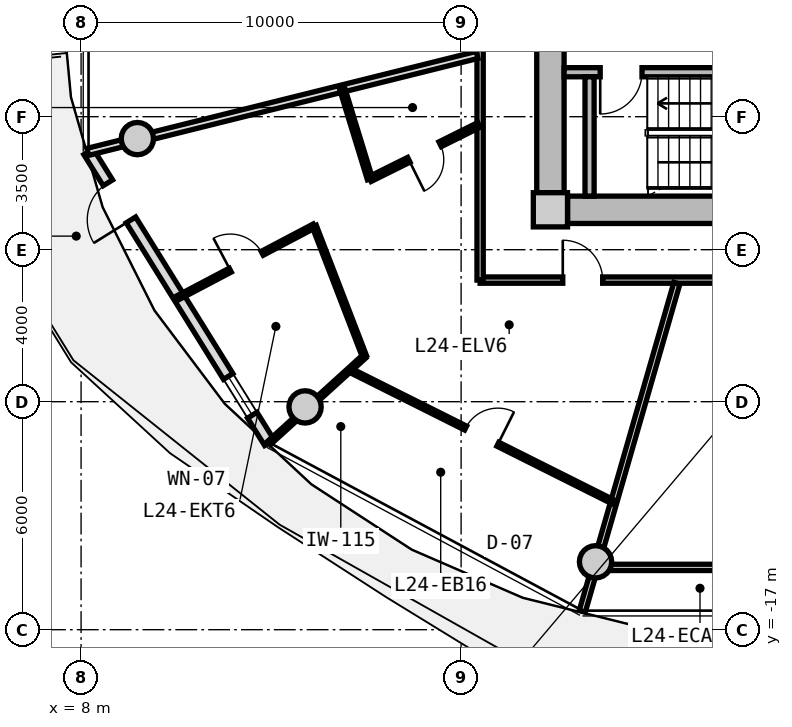
"""IFC4 building model, lengths in metres.
Left out: names, types, materials, properties, quantities, classifications, styles, units other than length and angle.
Written with IfcOpenShell. Run it as: python <this file> out.ifc"""

import sys

from ifc_helpers import new_model, si_unit, direction, frame, frame_2d, origin, origin_2d, place, context, subcontext, project, spatial, rectangle, circle, extrude, source, transform, mapped, element, fill, save


model = new_model("IFC4")
c1 = context("Model", 3, precision=1e-05, world=origin(), true_north=direction((0.0, 1.0)))
c2 = subcontext(c1, "Body", "Model", "MODEL_VIEW")
j1 = project(units=[si_unit("LENGTHUNIT", "METRE"), si_unit("PLANEANGLEUNIT", "RADIAN")], contexts=[c1])
p1 = place(None, origin())
s1 = spatial("IfcSite", under=j1, at=p1, CompositionType="ELEMENT")
p2 = place(p1, origin())
s2 = spatial("IfcBuilding", under=s1, at=p2, CompositionType="ELEMENT")
p3 = place(p2, frame((0.0, 0.0, 81.0)))
s3 = spatial("IfcBuildingStorey", under=s2, at=p3, CompositionType="ELEMENT", Elevation=81.0)
m1 = source(origin(), c2, "Body", "SweptSolid", [
    extrude(rectangle(XDim=0.9, YDim=0.9, at=origin_2d()), origin(), (0.0, 0.0, 1.0), 3.05),
])
p4 = place(p3, frame((20.35, -5.95, 0.0), z_axis=(0.0, 0.0, 1.0), x_axis=(1.0, 0.0, 0.0)))
e1 = element("IfcColumn", 1, at=p4, inside=s3, PredefinedType="COLUMN", context=c2, shape_type="MappedRepresentation", body=[
    mapped(m1, transform((0.0, 0.0, 0.0), x_axis=(1.0, 0.0, 0.0), y_axis=(0.0, 1.0, 0.0), z_axis=(0.0, 0.0, 1.0), scale=1.0)),
])
m2 = source(origin(), c2, "Body", "SweptSolid", [
    extrude(rectangle(XDim=14.4, YDim=0.72, at=frame_2d((7.2, 0.0))), origin(), (0.0, 0.0, 1.0), 2.79),
])
p5 = place(p3, frame((35.2, -5.95, 0.0), z_axis=(0.0, 0.0, 1.0), x_axis=(-1.0, 0.0, 0.0)))
e2 = element("IfcWall", 2, at=p5, inside=s3, PredefinedType="SHEAR", context=c2, shape_type="MappedRepresentation", body=[
    mapped(m2, transform((0.0, 0.0, 0.0), x_axis=(1.0, 0.0, 0.0), y_axis=(0.0, 1.0, 0.0), z_axis=(0.0, 0.0, 1.0), scale=1.0)),
])
m3 = source(origin(), c2, "Body", "SweptSolid", [
    extrude(rectangle(XDim=11.0, YDim=0.72, at=frame_2d((5.5, 0.0))), origin(), (0.0, 0.0, 1.0), 2.79),
])
p6 = place(p3, frame((20.35, -5.5, 0.0), z_axis=(0.0, 0.0, 1.0), x_axis=(0.0, 1.0, 0.0)))
e3 = element("IfcWall", 3, at=p6, inside=s3, PredefinedType="SHEAR", context=c2, shape_type="MappedRepresentation", body=[
    mapped(m3, transform((0.0, 0.0, 0.0), x_axis=(1.0, 0.0, 0.0), y_axis=(0.0, 1.0, 0.0), z_axis=(0.0, 0.0, 1.0), scale=1.0)),
])
p7 = place(p6, frame((3.8, 0.0, 0.0)))
e4 = element("IfcOpeningElement", 4, at=p7, cuts=e3, PredefinedType="OPENING", context=c2, shape_type="SweptSolid", body=[
    extrude(rectangle(XDim=1.2, YDim=2.15, at=frame_2d((0.6, 1.075))), frame((0.0, 0.37, 0.0), z_axis=(0.0, -1.0, 0.0), x_axis=(1.0, 0.0, 0.0)), (0.0, 0.0, 1.0), 0.74),
])
m4 = source(origin(), c2, "Body", "SweptSolid", [
    extrude(circle(Radius=0.425, at=origin_2d()), origin(), (0.0, 0.0, 1.0), 3.05),
])
for number, where, z_axis, x_axis in (
    (5, (9.481, -4.076, 0.0), (0.0, 0.0, 1.0), (1.0, 0.0, 0.0)),
    (6, (13.894, -11.137, 0.0), (0.0, 0.0, 1.0), (1.0, 0.0, 0.0)),
    (7, (21.537, -15.213, 0.0), (0.0, 0.0, 1.0), (1.0, 0.0, 0.0)),
):
    element("IfcColumn", number, at=place(p3, frame(where, z_axis=z_axis, x_axis=x_axis)), inside=s3, PredefinedType="COLUMN", context=c2, shape_type="MappedRepresentation", body=[
        mapped(m4, transform((0.0, 0.0, 0.0), x_axis=(1.0, 0.0, 0.0), y_axis=(0.0, 1.0, 0.0), z_axis=(0.0, 0.0, 1.0), scale=1.0)),
    ])
m5 = source(origin(), c2, "Body", "SweptSolid", [
    extrude(rectangle(XDim=9.014, YDim=0.29, at=frame_2d((4.507, 0.0))), origin(), (0.0, 0.0, 1.0), 2.79),
])
p8 = place(p3, frame((12.953, -12.077, 0.0), z_axis=(0.0, 0.0, 1.0), x_axis=(-0.527732945084, 0.849410347637, 0.0)))
e8 = element("IfcWall", 8, at=p8, inside=s3, PredefinedType="SOLIDWALL", context=c2, shape_type="MappedRepresentation", body=[
    mapped(m5, transform((0.0, 0.0, 0.0), x_axis=(1.0, 0.0, 0.0), y_axis=(0.0, 1.0, 0.0), z_axis=(0.0, 0.0, 1.0), scale=1.0)),
])
p9 = place(p8, frame((6.9, 0.0, 0.0)))
e9 = element("IfcOpeningElement", 9, at=p9, cuts=e8, PredefinedType="OPENING", context=c2, shape_type="SweptSolid", body=[
    extrude(rectangle(XDim=1.15, YDim=2.25, at=frame_2d((0.575, 1.125))), frame((0.0, 0.155, 0.0), z_axis=(0.0, -1.0, 0.0), x_axis=(1.0, 0.0, 0.0)), (0.0, 0.0, 1.0), 0.31),
])
p10 = place(p8, frame((0.85, 0.0, 0.85)))
e10 = element("IfcOpeningElement", 10, at=p10, cuts=e8, PredefinedType="OPENING", context=c2, shape_type="SweptSolid", body=[
    extrude(rectangle(XDim=1.2, YDim=1.5, at=frame_2d((0.6, 0.75))), frame((0.0, 0.155, 0.0), z_axis=(0.0, -1.0, 0.0), x_axis=(1.0, 0.0, 0.0)), (0.0, 0.0, 1.0), 0.31),
])
m6 = source(origin(), c2, "Body", "SweptSolid", [
    extrude(rectangle(XDim=7.83, YDim=0.24, at=frame_2d((3.915, 0.0))), origin(), (0.0, 0.0, 1.0), 2.79),
])
p11 = place(p3, frame((20.71, -2.33, 0.0), z_axis=(0.0, 0.0, 1.0), x_axis=(1.0, 0.0, 0.0)))
e11 = element("IfcWall", 11, at=p11, inside=s3, PredefinedType="PARTITIONING", context=c2, shape_type="MappedRepresentation", body=[
    mapped(m6, transform((0.0, 0.0, 0.0), x_axis=(1.0, 0.0, 0.0), y_axis=(0.0, 1.0, 0.0), z_axis=(0.0, 0.0, 1.0), scale=1.0)),
])
p12 = place(p11, frame((0.95, 0.0, 0.0)))
e12 = element("IfcOpeningElement", 12, at=p12, cuts=e11, PredefinedType="OPENING", context=c2, shape_type="SweptSolid", body=[
    extrude(rectangle(XDim=1.1, YDim=2.15, at=frame_2d((0.55, 1.075))), frame((0.0, 0.13, 0.0), z_axis=(0.0, -1.0, 0.0), x_axis=(1.0, 0.0, 0.0)), (0.0, 0.0, 1.0), 0.26),
])
m7 = source(origin(), c2, "Body", "SweptSolid", [
    extrude(rectangle(XDim=3.14, YDim=0.24, at=frame_2d((1.57, 0.0))), origin(), (0.0, 0.0, 1.0), 2.79),
])
p13 = place(p3, frame((21.38, -5.59, 0.0), z_axis=(0.0, 0.0, 1.0), x_axis=(0.0, 1.0, 0.0)))
e13 = element("IfcWall", 13, at=p13, inside=s3, PredefinedType="PARTITIONING", context=c2, shape_type="MappedRepresentation", body=[
    mapped(m7, transform((0.0, 0.0, 0.0), x_axis=(1.0, 0.0, 0.0), y_axis=(0.0, 1.0, 0.0), z_axis=(0.0, 0.0, 1.0), scale=1.0)),
])
m8 = source(origin(), c2, "Body", "SweptSolid", [
    extrude(rectangle(XDim=8.6, YDim=0.165, at=frame_2d((4.3, 0.0))), origin(), (0.0, 0.0, 1.0), 2.775),
])
p14 = place(p3, frame((27.1, -7.8, 0.0), z_axis=(0.0, 0.0, 1.0), x_axis=(-1.0, 0.0, 0.0)))
e14 = element("IfcWall", 14, at=p14, inside=s3, PredefinedType="PARTITIONING", context=c2, shape_type="MappedRepresentation", body=[
    mapped(m8, transform((0.0, 0.0, 0.0), x_axis=(1.0, 0.0, 0.0), y_axis=(0.0, 1.0, 0.0), z_axis=(0.0, 0.0, 1.0), scale=1.0)),
])
p15 = place(p14, frame((5.375, 0.0, 0.0)))
e15 = element("IfcOpeningElement", 15, at=p15, cuts=e14, PredefinedType="OPENING", context=c2, shape_type="SweptSolid", body=[
    extrude(rectangle(XDim=1.05, YDim=2.15, at=frame_2d((0.525, 1.075))), frame((0.0, 0.093, 0.0), z_axis=(0.0, -1.0, 0.0), x_axis=(1.0, 0.0, 0.0)), (0.0, 0.0, 1.0), 0.185),
])
m9 = source(origin(), c2, "Body", "SweptSolid", [
    extrude(rectangle(XDim=15.6, YDim=0.165, at=frame_2d((7.8, 0.0))), origin(), (0.0, 0.0, 1.0), 2.775),
])
p16 = place(p3, frame((18.5, -7.8, 0.0), z_axis=(0.0, 0.0, 1.0), x_axis=(0.0, 1.0, 0.0)))
e16 = element("IfcWall", 16, at=p16, inside=s3, PredefinedType="PARTITIONING", context=c2, shape_type="MappedRepresentation", body=[
    mapped(m9, transform((0.0, 0.0, 0.0), x_axis=(1.0, 0.0, 0.0), y_axis=(0.0, 1.0, 0.0), z_axis=(0.0, 0.0, 1.0), scale=1.0)),
])
p17 = place(p16, frame((11.623, 0.0, 0.0)))
e17 = element("IfcOpeningElement", 17, at=p17, cuts=e16, PredefinedType="OPENING", context=c2, shape_type="SweptSolid", body=[
    extrude(rectangle(XDim=1.25, YDim=2.2, at=frame_2d((0.625, 1.1))), frame((0.0, 0.093, 0.0), z_axis=(0.0, -1.0, 0.0), x_axis=(1.0, 0.0, 0.0)), (0.0, 0.0, 1.0), 0.185),
])
p18 = place(p16, frame((7.175, 0.0, 0.0)))
e18 = element("IfcOpeningElement", 18, at=p18, cuts=e16, PredefinedType="OPENING", context=c2, shape_type="SweptSolid", body=[
    extrude(rectangle(XDim=1.25, YDim=2.2, at=frame_2d((0.625, 1.1))), frame((0.0, 0.093, 0.0), z_axis=(0.0, -1.0, 0.0), x_axis=(1.0, 0.0, 0.0)), (0.0, 0.0, 1.0), 0.185),
])
m10 = source(origin(), c2, "Body", "SweptSolid", [
    extrude(rectangle(XDim=8.989, YDim=0.165, at=frame_2d((4.495, 0.0))), origin(), (0.0, 0.0, 1.0), 2.275),
])
p19 = place(p3, frame((23.678, -7.88, 0.0), z_axis=(0.0, 0.0, 1.0), x_axis=(-0.27702323008, -0.960863221274, 0.0)))
e19 = element("IfcWall", 19, at=p19, inside=s3, PredefinedType="PARTITIONING", context=c2, shape_type="MappedRepresentation", body=[
    mapped(m10, transform((0.0, 0.0, 0.0), x_axis=(1.0, 0.0, 0.0), y_axis=(0.0, 1.0, 0.0), z_axis=(0.0, 0.0, 1.0), scale=1.0)),
])
m11 = source(origin(), c2, "Body", "SweptSolid", [
    extrude(rectangle(XDim=5.814, YDim=0.165, at=frame_2d((2.907, 0.0))), origin(), (0.0, 0.0, 1.0), 2.275),
])
p20 = place(p3, frame((21.366, -15.36, 0.0), z_axis=(0.0, 0.0, 1.0), x_axis=(1.0, 0.0, 0.0)))
e20 = element("IfcWall", 20, at=p20, inside=s3, PredefinedType="PARTITIONING", context=c2, shape_type="MappedRepresentation", body=[
    mapped(m11, transform((0.0, 0.0, 0.0), x_axis=(1.0, 0.0, 0.0), y_axis=(0.0, 1.0, 0.0), z_axis=(0.0, 0.0, 1.0), scale=1.0)),
])
m12 = source(origin(), c2, "Body", "SweptSolid", [
    extrude(rectangle(XDim=10.556, YDim=0.19, at=frame_2d((5.278, 0.0))), origin(), (0.0, 0.0, 1.0), 2.275),
])
p21 = place(p3, frame((18.42, -1.875, 0.0), z_axis=(0.0, 0.0, 1.0), x_axis=(-0.970363857851, -0.241648470667, 0.0)))
e21 = element("IfcWall", 21, at=p21, inside=s3, PredefinedType="PARTITIONING", context=c2, shape_type="MappedRepresentation", body=[
    mapped(m12, transform((0.0, 0.0, 0.0), x_axis=(1.0, 0.0, 0.0), y_axis=(0.0, 1.0, 0.0), z_axis=(0.0, 0.0, 1.0), scale=1.0)),
])
m13 = source(origin(), c2, "Body", "SweptSolid", [
    extrude(rectangle(XDim=7.767, YDim=0.115, at=frame_2d((3.884, 0.0))), origin(), (0.0, 0.0, 1.0), 2.775),
])
p22 = place(p3, frame((15.07, -10.167, 0.0), z_axis=(0.0, 0.0, 1.0), x_axis=(0.894188177352, -0.447691303783, 0.0)))
e22 = element("IfcWall", 22, at=p22, inside=s3, PredefinedType="PARTITIONING", context=c2, shape_type="MappedRepresentation", body=[
    mapped(m13, transform((0.0, 0.0, 0.0), x_axis=(1.0, 0.0, 0.0), y_axis=(0.0, 1.0, 0.0), z_axis=(0.0, 0.0, 1.0), scale=1.0)),
])
p23 = place(p22, frame((3.409, 0.0, 0.0)))
e23 = element("IfcOpeningElement", 23, at=p23, cuts=e22, PredefinedType="OPENING", context=c2, shape_type="SweptSolid", body=[
    extrude(rectangle(XDim=0.95, YDim=2.1, at=frame_2d((0.475, 1.05))), frame((0.0, 0.067, 0.0), z_axis=(0.0, -1.0, 0.0), x_axis=(1.0, 0.0, 0.0)), (0.0, 0.0, 1.0), 0.135),
])
m14 = source(origin(), c2, "Body", "SweptSolid", [
    extrude(rectangle(XDim=3.393, YDim=0.115, at=frame_2d((1.696, 0.0))), origin(), (0.0, 0.0, 1.0), 2.415),
])
p24 = place(p3, frame((15.451, -9.811, 0.0), z_axis=(0.0, 0.0, 1.0), x_axis=(-0.740356690907, -0.672214229416, 0.0)))
e24 = element("IfcWall", 24, at=p24, inside=s3, PredefinedType="PARTITIONING", context=c2, shape_type="MappedRepresentation", body=[
    mapped(m14, transform((0.0, 0.0, 0.0), x_axis=(1.0, 0.0, 0.0), y_axis=(0.0, 1.0, 0.0), z_axis=(0.0, 0.0, 1.0), scale=1.0)),
])
m15 = source(origin(), c2, "Body", "SweptSolid", [
    extrude(rectangle(XDim=3.203, YDim=0.14, at=frame_2d((1.601, 0.0))), origin(), (0.0, 0.0, 1.0), 2.775),
])
p25 = place(p3, frame((18.47, -3.717, 0.0), z_axis=(0.0, 0.0, 1.0), x_axis=(-0.895552551978, -0.444955758077, 0.0)))
e25 = element("IfcWall", 25, at=p25, inside=s3, PredefinedType="PARTITIONING", context=c2, shape_type="MappedRepresentation", body=[
    mapped(m15, transform((0.0, 0.0, 0.0), x_axis=(1.0, 0.0, 0.0), y_axis=(0.0, 1.0, 0.0), z_axis=(0.0, 0.0, 1.0), scale=1.0)),
])
p26 = place(p25, frame((1.141, 0.0, 0.0)))
e26 = element("IfcOpeningElement", 26, at=p26, cuts=e25, PredefinedType="OPENING", context=c2, shape_type="SweptSolid", body=[
    extrude(rectangle(XDim=0.92, YDim=2.1, at=frame_2d((0.46, 1.05))), frame((0.0, 0.08, 0.0), z_axis=(0.0, -1.0, 0.0), x_axis=(1.0, 0.0, 0.0)), (0.0, 0.0, 1.0), 0.16),
])
m16 = source(origin(), c2, "Body", "SweptSolid", [
    extrude(rectangle(XDim=2.478, YDim=0.14, at=frame_2d((1.239, 0.0))), origin(), (0.0, 0.0, 1.0), 2.775),
])
p27 = place(p3, frame((15.602, -5.142, 0.0), z_axis=(0.0, 0.0, 1.0), x_axis=(-0.293372504398, 0.955998207981, 0.0)))
e27 = element("IfcWall", 27, at=p27, inside=s3, PredefinedType="PARTITIONING", context=c2, shape_type="MappedRepresentation", body=[
    mapped(m16, transform((0.0, 0.0, 0.0), x_axis=(1.0, 0.0, 0.0), y_axis=(0.0, 1.0, 0.0), z_axis=(0.0, 0.0, 1.0), scale=1.0)),
])
m17 = source(origin(), c2, "Body", "SweptSolid", [
    extrude(rectangle(XDim=4.042, YDim=0.115, at=frame_2d((2.021, 0.0))), origin(), (0.0, 0.0, 1.0), 2.775),
])
p28 = place(p3, frame((14.134, -6.375, 0.0), z_axis=(0.0, 0.0, 1.0), x_axis=(-0.88476748851, -0.466032714812, 0.0)))
e28 = element("IfcWall", 28, at=p28, inside=s3, PredefinedType="PARTITIONING", context=c2, shape_type="MappedRepresentation", body=[
    mapped(m17, transform((0.0, 0.0, 0.0), x_axis=(1.0, 0.0, 0.0), y_axis=(0.0, 1.0, 0.0), z_axis=(0.0, 0.0, 1.0), scale=1.0)),
])
p29 = place(p28, frame((1.546, 0.0, 0.0)))
e29 = element("IfcOpeningElement", 29, at=p29, cuts=e28, PredefinedType="OPENING", context=c2, shape_type="SweptSolid", body=[
    extrude(rectangle(XDim=0.95, YDim=2.1, at=frame_2d((0.475, 1.05))), frame((0.0, 0.067, 0.0), z_axis=(0.0, -1.0, 0.0), x_axis=(1.0, 0.0, 0.0)), (0.0, 0.0, 1.0), 0.135),
])
m18 = source(origin(), c2, "Body", "SweptSolid", [
    extrude(rectangle(XDim=3.677, YDim=0.115, at=frame_2d((1.838, 0.0))), origin(), (0.0, 0.0, 1.0), 2.775),
])
p30 = place(p3, frame((14.134, -6.375, 0.0), z_axis=(0.0, 0.0, 1.0), x_axis=(0.359592980271, -0.933109258629, 0.0)))
e30 = element("IfcWall", 30, at=p30, inside=s3, PredefinedType="PARTITIONING", context=c2, shape_type="MappedRepresentation", body=[
    mapped(m18, transform((0.0, 0.0, 0.0), x_axis=(1.0, 0.0, 0.0), y_axis=(0.0, 1.0, 0.0), z_axis=(0.0, 0.0, 1.0), scale=1.0)),
])
m19 = source(origin(), c2, "Body", "SweptSolid", [
    extrude(rectangle(XDim=1.15, YDim=2.25, at=frame_2d((0.575, 1.125))), frame((0.0, 0.025, 0.0), z_axis=(0.0, -1.0, 0.0), x_axis=(1.0, 0.0, 0.0)), (0.0, 0.0, 1.0), 0.05),
])
p31 = place(p9, origin())
e31 = element("IfcDoor", 31, at=p31, inside=s3, OperationType="SINGLE_SWING_LEFT", PredefinedType="DOOR", context=c2, shape_type="MappedRepresentation", body=[
    mapped(m19, transform((0.0, 0.0, 0.0), x_axis=(1.0, 0.0, 0.0), y_axis=(0.0, 1.0, 0.0), z_axis=(0.0, 0.0, 1.0), scale=1.0)),
])
fill(e9, e31)
m20 = source(origin(), c2, "Body", "SweptSolid", [
    extrude(rectangle(XDim=1.2, YDim=1.5, at=frame_2d((0.6, 0.75))), frame((0.0, 0.03, 0.0), z_axis=(0.0, -1.0, 0.0), x_axis=(1.0, 0.0, 0.0)), (0.0, 0.0, 1.0), 0.06),
])
p32 = place(p10, origin())
e32 = element("IfcWindow", 32, at=p32, inside=s3, PartitioningType="SINGLE_PANEL", PredefinedType="WINDOW", context=c2, shape_type="MappedRepresentation", body=[
    mapped(m20, transform((0.0, 0.0, 0.0), x_axis=(1.0, 0.0, 0.0), y_axis=(0.0, 1.0, 0.0), z_axis=(0.0, 0.0, 1.0), scale=1.0)),
])
fill(e10, e32)
m21 = source(origin(), c2, "Body", "SweptSolid", [
    extrude(rectangle(XDim=1.1, YDim=2.15, at=frame_2d((0.55, 1.075))), frame((0.0, 0.025, 0.0), z_axis=(0.0, -1.0, 0.0), x_axis=(1.0, 0.0, 0.0)), (0.0, 0.0, 1.0), 0.05),
])
p33 = place(p12, frame((1.1, 0.0, 0.0), z_axis=(0.0, 0.0, 1.0), x_axis=(-1.0, 0.0, 0.0)))
e33 = element("IfcDoor", 33, at=p33, inside=s3, OperationType="SINGLE_SWING_RIGHT", PredefinedType="DOOR", context=c2, shape_type="MappedRepresentation", body=[
    mapped(m21, transform((0.0, 0.0, 0.0), x_axis=(1.0, 0.0, 0.0), y_axis=(0.0, 1.0, 0.0), z_axis=(0.0, 0.0, 1.0), scale=1.0)),
])
fill(e12, e33)
m22 = source(origin(), c2, "Body", "SweptSolid", [
    extrude(rectangle(XDim=1.05, YDim=2.15, at=frame_2d((0.525, 1.075))), frame((0.0, 0.025, 0.0), z_axis=(0.0, -1.0, 0.0), x_axis=(1.0, 0.0, 0.0)), (0.0, 0.0, 1.0), 0.05),
])
p34 = place(p15, frame((1.05, 0.0, 0.0), z_axis=(0.0, 0.0, 1.0), x_axis=(-1.0, 0.0, 0.0)))
e34 = element("IfcDoor", 34, at=p34, inside=s3, OperationType="SINGLE_SWING_LEFT", PredefinedType="DOOR", context=c2, shape_type="MappedRepresentation", body=[
    mapped(m22, transform((0.0, 0.0, 0.0), x_axis=(1.0, 0.0, 0.0), y_axis=(0.0, 1.0, 0.0), z_axis=(0.0, 0.0, 1.0), scale=1.0)),
])
fill(e15, e34)
m23 = source(origin(), c2, "Body", "SweptSolid", [
    extrude(rectangle(XDim=0.92, YDim=2.1, at=frame_2d((0.46, 1.05))), frame((0.0, 0.025, 0.0), z_axis=(0.0, -1.0, 0.0), x_axis=(1.0, 0.0, 0.0)), (0.0, 0.0, 1.0), 0.05),
])
p35 = place(p26, origin())
e35 = element("IfcDoor", 35, at=p35, inside=s3, OperationType="SINGLE_SWING_RIGHT", PredefinedType="DOOR", context=c2, shape_type="MappedRepresentation", body=[
    mapped(m23, transform((0.0, 0.0, 0.0), x_axis=(1.0, 0.0, 0.0), y_axis=(0.0, 1.0, 0.0), z_axis=(0.0, 0.0, 1.0), scale=1.0)),
])
fill(e26, e35)
m24 = source(origin(), c2, "Body", "SweptSolid", [
    extrude(rectangle(XDim=0.95, YDim=2.1, at=frame_2d((0.475, 1.05))), frame((0.0, 0.025, 0.0), z_axis=(0.0, -1.0, 0.0), x_axis=(1.0, 0.0, 0.0)), (0.0, 0.0, 1.0), 0.05),
])
p36 = place(p29, frame((0.95, 0.0, 0.0), z_axis=(0.0, 0.0, 1.0), x_axis=(-1.0, 0.0, 0.0)))
e36 = element("IfcDoor", 36, at=p36, inside=s3, OperationType="SINGLE_SWING_LEFT", PredefinedType="DOOR", context=c2, shape_type="MappedRepresentation", body=[
    mapped(m24, transform((0.0, 0.0, 0.0), x_axis=(1.0, 0.0, 0.0), y_axis=(0.0, 1.0, 0.0), z_axis=(0.0, 0.0, 1.0), scale=1.0)),
])
fill(e29, e36)
p37 = place(p23, origin())
e37 = element("IfcDoor", 37, at=p37, inside=s3, OperationType="SINGLE_SWING_RIGHT", PredefinedType="DOOR", context=c2, shape_type="MappedRepresentation", body=[
    mapped(m24, transform((0.0, 0.0, 0.0), x_axis=(1.0, 0.0, 0.0), y_axis=(0.0, 1.0, 0.0), z_axis=(0.0, 0.0, 1.0), scale=1.0)),
])
fill(e23, e37)
save(model, sys.argv[1])
